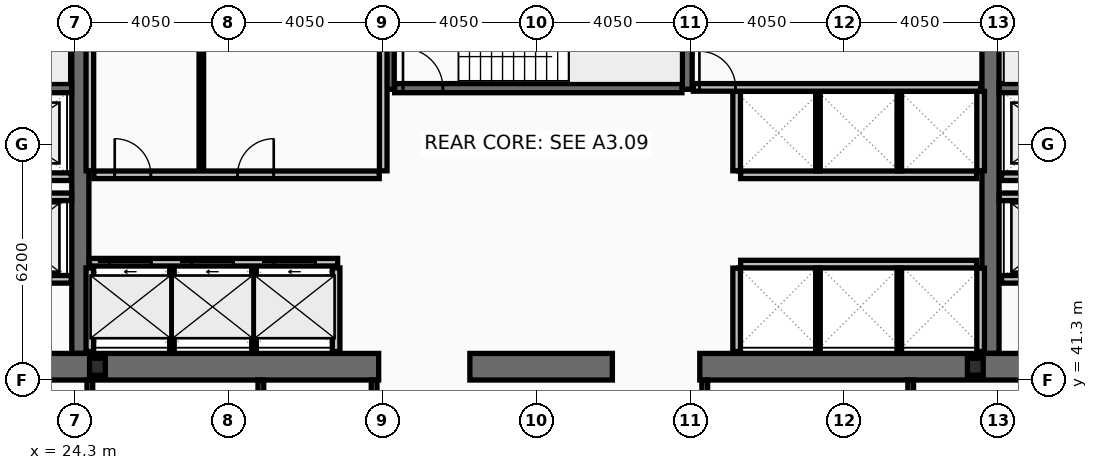
"""IFC4 building model, lengths in metres.
Left out: names, types, materials, properties, quantities, classifications, styles, units other than length and angle.
Written with IfcOpenShell. Run it as: python <this file> out.ifc"""

import sys

from ifc_helpers import new_model, si_unit, direction, frame, frame_2d, origin, origin_2d, place, context, subcontext, project, spatial, rectangle, i_section, extrude, element, fill, save


model = new_model("IFC4")
c1 = context("Model", 3, precision=1e-05, world=origin(), true_north=direction((0.0, 1.0)))
c2 = subcontext(c1, "Body", "Model", "MODEL_VIEW")
j1 = project(units=[si_unit("LENGTHUNIT", "METRE"), si_unit("PLANEANGLEUNIT", "RADIAN")], contexts=[c1])
p1 = place(None, origin())
s1 = spatial("IfcSite", under=j1, at=p1, CompositionType="ELEMENT")
p2 = place(p1, origin())
s2 = spatial("IfcBuilding", under=s1, at=p2, CompositionType="ELEMENT")
p3 = place(p2, frame((0.0, 0.0, 161.4)))
s3 = spatial("IfcBuildingStorey", under=s2, at=p3, CompositionType="ELEMENT", Elevation=161.4)
for number, where, z_axis, x_axis in (
    (1, (24.45, 42.0, 0.0), (0.0, 0.0, 1.0), (0.0, 1.0, 0.0)),
    (2, (48.4, 42.0, 0.0), (0.0, 0.0, 1.0), (0.0, 1.0, 0.0)),
):
    element("IfcWall", number, at=place(p3, frame(where, z_axis=z_axis, x_axis=x_axis)), inside=s3, PredefinedType="SHEAR", context=c2, shape_type="SweptSolid", body=[
        extrude(rectangle(XDim=11.0, YDim=0.45, at=frame_2d((5.5, 0.0))), origin(), (0.0, 0.0, 1.0), 3.44),
    ])
p4 = place(p3, frame((32.3, 41.65, 0.0), z_axis=(0.0, 0.0, 1.0), x_axis=(-1.0, 0.0, 0.0)))
e3 = element("IfcWall", 3, at=p4, inside=s3, PredefinedType="SHEAR", context=c2, shape_type="SweptSolid", body=[
    extrude(rectangle(XDim=11.45, YDim=0.7, at=frame_2d((5.725, 0.0))), origin(), (0.0, 0.0, 1.0), 3.44),
])
p5 = place(p3, frame((38.45, 41.65, 0.0), z_axis=(0.0, 0.0, 1.0), x_axis=(-1.0, 0.0, 0.0)))
e4 = element("IfcWall", 4, at=p5, inside=s3, PredefinedType="SHEAR", context=c2, shape_type="SweptSolid", body=[
    extrude(rectangle(XDim=3.75, YDim=0.7, at=frame_2d((1.875, 0.0))), origin(), (0.0, 0.0, 1.0), 3.44),
])
p6 = place(p3, frame((52.05, 41.65, 0.0), z_axis=(0.0, 0.0, 1.0), x_axis=(-1.0, 0.0, 0.0)))
e5 = element("IfcWall", 5, at=p6, inside=s3, PredefinedType="SHEAR", context=c2, shape_type="SweptSolid", body=[
    extrude(rectangle(XDim=11.3, YDim=0.7, at=frame_2d((5.65, 0.0))), origin(), (0.0, 0.0, 1.0), 3.44),
])
for number, where, z_axis, x_axis in (
    (6, (32.58, 48.95, 0.0), (0.0, 0.0, 1.0), (0.0, 1.0, 0.0)),
    (7, (40.42, 48.95, 0.0), (0.0, 0.0, 1.0), (0.0, 1.0, 0.0)),
):
    element("IfcWall", number, at=place(p3, frame(where, z_axis=z_axis, x_axis=x_axis)), inside=s3, PredefinedType="SHEAR", context=c2, shape_type="SweptSolid", body=[
        extrude(rectangle(XDim=4.05, YDim=0.26, at=frame_2d((2.025, 0.0))), origin(), (0.0, 0.0, 1.0), 3.44),
    ])
p7 = place(p3, frame((16.9, 48.98, 0.0), z_axis=(0.0, 0.0, 1.0), x_axis=(1.0, 0.0, 0.0)))
e8 = element("IfcWall", 8, at=p7, inside=s3, PredefinedType="SHEAR", context=c2, shape_type="SweptSolid", body=[
    extrude(rectangle(XDim=7.32, YDim=0.24, at=frame_2d((3.66, 0.0))), origin(), (0.0, 0.0, 1.0), 3.44),
])
p8 = place(p7, frame((0.22, 0.0, 0.0)))
e9 = element("IfcOpeningElement", 9, at=p8, cuts=e8, PredefinedType="OPENING", context=c2, shape_type="SweptSolid", body=[
    extrude(rectangle(XDim=1.05, YDim=2.15, at=frame_2d((0.525, 1.075))), frame((0.0, 0.13, 0.0), z_axis=(0.0, -1.0, 0.0), x_axis=(1.0, 0.0, 0.0)), (0.0, 0.0, 1.0), 0.26),
])
p9 = place(p3, frame((48.63, 48.98, 0.0), z_axis=(0.0, 0.0, 1.0), x_axis=(1.0, 0.0, 0.0)))
e10 = element("IfcWall", 10, at=p9, inside=s3, PredefinedType="SHEAR", context=c2, shape_type="SweptSolid", body=[
    extrude(rectangle(XDim=7.37, YDim=0.24, at=frame_2d((3.685, 0.0))), origin(), (0.0, 0.0, 1.0), 3.44),
])
p10 = place(p9, frame((6.1, 0.0, 0.0)))
e11 = element("IfcOpeningElement", 11, at=p10, cuts=e10, PredefinedType="OPENING", context=c2, shape_type="SweptSolid", body=[
    extrude(rectangle(XDim=1.05, YDim=2.15, at=frame_2d((0.525, 1.075))), frame((0.0, 0.13, 0.0), z_axis=(0.0, -1.0, 0.0), x_axis=(1.0, 0.0, 0.0)), (0.0, 0.0, 1.0), 0.26),
])
p11 = place(p3, frame((32.72, 48.98, 0.0), z_axis=(0.0, 0.0, 1.0), x_axis=(1.0, 0.0, 0.0)))
e12 = element("IfcWall", 12, at=p11, inside=s3, PredefinedType="SHEAR", context=c2, shape_type="SweptSolid", body=[
    extrude(rectangle(XDim=7.56, YDim=0.24, at=frame_2d((3.78, 0.0))), origin(), (0.0, 0.0, 1.0), 3.44),
])
p12 = place(p11, frame((0.22, 0.0, 0.0)))
e13 = element("IfcOpeningElement", 13, at=p12, cuts=e12, PredefinedType="OPENING", context=c2, shape_type="SweptSolid", body=[
    extrude(rectangle(XDim=1.05, YDim=2.15, at=frame_2d((0.525, 1.075))), frame((0.0, 0.13, 0.0), z_axis=(0.0, -1.0, 0.0), x_axis=(1.0, 0.0, 0.0)), (0.0, 0.0, 1.0), 0.26),
])
for number, where, z_axis, x_axis in (
    (14, (24.9, 41.65, 0.0), (0.0, 0.0, 1.0), (1.0, 0.0, 0.0)),
    (15, (48.0, 41.65, 0.0), (0.0, 0.0, 1.0), (1.0, 0.0, 0.0)),
):
    element("IfcColumn", number, at=place(p3, frame(where, z_axis=z_axis, x_axis=x_axis)), inside=s3, PredefinedType="COLUMN", context=c2, shape_type="SweptSolid", body=[
        extrude(i_section(OverallWidth=0.416, OverallDepth=0.446, WebThickness=0.039, FlangeThickness=0.063, at=origin_2d()), origin(), (0.0, 0.0, 1.0), 3.6),
    ])
p13 = place(p3, frame((24.69, 44.4, 0.0), z_axis=(0.0, 0.0, 1.0), x_axis=(1.0, 0.0, 0.0)))
e16 = element("IfcWall", 16, at=p13, inside=s3, PredefinedType="PARTITIONING", context=c2, shape_type="SweptSolid", body=[
    extrude(rectangle(XDim=6.53, YDim=0.2, at=frame_2d((3.265, 0.0))), origin(), (0.0, 0.0, 1.0), 3.44),
])
p14 = place(p13, frame((0.53, 0.0, 0.0)))
e17 = element("IfcOpeningElement", 17, at=p14, cuts=e16, PredefinedType="OPENING", context=c2, shape_type="SweptSolid", body=[
    extrude(rectangle(XDim=1.1, YDim=2.18, at=frame_2d((0.55, 1.09))), frame((0.0, 0.11, 0.0), z_axis=(0.0, -1.0, 0.0), x_axis=(1.0, 0.0, 0.0)), (0.0, 0.0, 1.0), 0.22),
])
p15 = place(p13, frame((2.69, 0.0, 0.0)))
e18 = element("IfcOpeningElement", 18, at=p15, cuts=e16, PredefinedType="OPENING", context=c2, shape_type="SweptSolid", body=[
    extrude(rectangle(XDim=1.1, YDim=2.18, at=frame_2d((0.55, 1.09))), frame((0.0, 0.11, 0.0), z_axis=(0.0, -1.0, 0.0), x_axis=(1.0, 0.0, 0.0)), (0.0, 0.0, 1.0), 0.22),
])
p16 = place(p13, frame((4.85, 0.0, 0.0)))
e19 = element("IfcOpeningElement", 19, at=p16, cuts=e16, PredefinedType="OPENING", context=c2, shape_type="SweptSolid", body=[
    extrude(rectangle(XDim=1.1, YDim=2.18, at=frame_2d((0.55, 1.09))), frame((0.0, 0.11, 0.0), z_axis=(0.0, -1.0, 0.0), x_axis=(1.0, 0.0, 0.0)), (0.0, 0.0, 1.0), 0.22),
])
p17 = place(p3, frame((51.61, 43.95, 0.0), z_axis=(0.0, 0.0, 1.0), x_axis=(-1.0, 0.0, 0.0)))
e20 = element("IfcWall", 20, at=p17, inside=s3, PredefinedType="PARTITIONING", context=c2, shape_type="SweptSolid", body=[
    extrude(rectangle(XDim=2.92, YDim=0.2, at=frame_2d((1.46, 0.0))), origin(), (0.0, 0.0, 1.0), 3.44),
])
p18 = place(p17, frame((0.81, 0.0, 0.0)))
e21 = element("IfcOpeningElement", 21, at=p18, cuts=e20, PredefinedType="OPENING", context=c2, shape_type="SweptSolid", body=[
    extrude(rectangle(XDim=1.3, YDim=2.18, at=frame_2d((0.65, 1.09))), frame((0.0, 0.11, 0.0), z_axis=(0.0, -1.0, 0.0), x_axis=(1.0, 0.0, 0.0)), (0.0, 0.0, 1.0), 0.22),
])
p19 = place(p3, frame((24.21, 43.95, 0.0), z_axis=(0.0, 0.0, 1.0), x_axis=(-1.0, 0.0, 0.0)))
e22 = element("IfcWall", 22, at=p19, inside=s3, PredefinedType="PARTITIONING", context=c2, shape_type="SweptSolid", body=[
    extrude(rectangle(XDim=2.97, YDim=0.2, at=frame_2d((1.485, 0.0))), origin(), (0.0, 0.0, 1.0), 3.44),
])
p20 = place(p19, frame((0.86, 0.0, 0.0)))
e23 = element("IfcOpeningElement", 23, at=p20, cuts=e22, PredefinedType="OPENING", context=c2, shape_type="SweptSolid", body=[
    extrude(rectangle(XDim=1.3, YDim=2.18, at=frame_2d((0.65, 1.09))), frame((0.0, 0.11, 0.0), z_axis=(0.0, -1.0, 0.0), x_axis=(1.0, 0.0, 0.0)), (0.0, 0.0, 1.0), 0.22),
])
p21 = place(p3, frame((51.61, 46.65, 0.0), z_axis=(0.0, 0.0, 1.0), x_axis=(-1.0, 0.0, 0.0)))
e24 = element("IfcWall", 24, at=p21, inside=s3, PredefinedType="PARTITIONING", context=c2, shape_type="SweptSolid", body=[
    extrude(rectangle(XDim=2.92, YDim=0.2, at=frame_2d((1.46, 0.0))), origin(), (0.0, 0.0, 1.0), 3.44),
])
p22 = place(p21, frame((0.86, 0.0, 0.0)))
e25 = element("IfcOpeningElement", 25, at=p22, cuts=e24, PredefinedType="OPENING", context=c2, shape_type="SweptSolid", body=[
    extrude(rectangle(XDim=1.2, YDim=2.18, at=frame_2d((0.6, 1.09))), frame((0.0, 0.11, 0.0), z_axis=(0.0, -1.0, 0.0), x_axis=(1.0, 0.0, 0.0)), (0.0, 0.0, 1.0), 0.22),
])
p23 = place(p3, frame((24.21, 46.65, 0.0), z_axis=(0.0, 0.0, 1.0), x_axis=(-1.0, 0.0, 0.0)))
e26 = element("IfcWall", 26, at=p23, inside=s3, PredefinedType="PARTITIONING", context=c2, shape_type="SweptSolid", body=[
    extrude(rectangle(XDim=2.97, YDim=0.2, at=frame_2d((1.485, 0.0))), origin(), (0.0, 0.0, 1.0), 3.44),
])
p24 = place(p23, frame((0.91, 0.0, 0.0)))
e27 = element("IfcOpeningElement", 27, at=p24, cuts=e26, PredefinedType="OPENING", context=c2, shape_type="SweptSolid", body=[
    extrude(rectangle(XDim=1.2, YDim=2.18, at=frame_2d((0.6, 1.09))), frame((0.0, 0.11, 0.0), z_axis=(0.0, -1.0, 0.0), x_axis=(1.0, 0.0, 0.0)), (0.0, 0.0, 1.0), 0.22),
])
p25 = place(p3, frame((21.2, 46.12, 0.0), z_axis=(0.0, 0.0, 1.0), x_axis=(1.0, 0.0, 0.0)))
e28 = element("IfcWall", 28, at=p25, inside=s3, PredefinedType="PARTITIONING", context=c2, shape_type="SweptSolid", body=[
    extrude(rectangle(XDim=3.02, YDim=0.2, at=frame_2d((1.51, 0.0))), origin(), (0.0, 0.0, 1.0), 3.44),
])
p26 = place(p3, frame((48.63, 46.12, 0.0), z_axis=(0.0, 0.0, 1.0), x_axis=(1.0, 0.0, 0.0)))
e29 = element("IfcWall", 29, at=p26, inside=s3, PredefinedType="PARTITIONING", context=c2, shape_type="SweptSolid", body=[
    extrude(rectangle(XDim=3.07, YDim=0.2, at=frame_2d((1.535, 0.0))), origin(), (0.0, 0.0, 1.0), 3.44),
])
for number, where, z_axis, x_axis in (
    (30, (24.7, 46.805, 0.0), (0.0, 0.0, 1.0), (0.0, 1.0, 0.0)),
    (31, (32.42, 46.805, 0.0), (0.0, 0.0, 1.0), (0.0, 1.0, 0.0)),
):
    element("IfcWall", number, at=place(p3, frame(where, z_axis=z_axis, x_axis=x_axis)), inside=s3, PredefinedType="PARTITIONING", context=c2, shape_type="SweptSolid", body=[
        extrude(rectangle(XDim=5.99, YDim=0.2, at=frame_2d((2.995, 0.0))), origin(), (0.0, 0.0, 1.0), 3.44),
    ])
p27 = place(p3, frame((27.634, 46.805, 0.0), z_axis=(0.0, 0.0, 1.0), x_axis=(0.0, 1.0, 0.0)))
e32 = element("IfcWall", 32, at=p27, inside=s3, PredefinedType="PARTITIONING", context=c2, shape_type="SweptSolid", body=[
    extrude(rectangle(XDim=5.99, YDim=0.12, at=frame_2d((2.995, 0.0))), origin(), (0.0, 0.0, 1.0), 3.44),
])
p28 = place(p3, frame((24.805, 46.7, 0.0), z_axis=(0.0, 0.0, 1.0), x_axis=(1.0, 0.0, 0.0)))
e33 = element("IfcWall", 33, at=p28, inside=s3, PredefinedType="PARTITIONING", context=c2, shape_type="SweptSolid", body=[
    extrude(rectangle(XDim=7.51, YDim=0.2, at=frame_2d((3.755, 0.0))), origin(), (0.0, 0.0, 1.0), 3.44),
])
p29 = place(p28, frame((0.55, 0.0, 0.0)))
e34 = element("IfcOpeningElement", 34, at=p29, cuts=e33, PredefinedType="OPENING", context=c2, shape_type="SweptSolid", body=[
    extrude(rectangle(XDim=0.95, YDim=2.1, at=frame_2d((0.475, 1.05))), frame((0.0, 0.11, 0.0), z_axis=(0.0, -1.0, 0.0), x_axis=(1.0, 0.0, 0.0)), (0.0, 0.0, 1.0), 0.22),
])
p30 = place(p28, frame((3.784, 0.0, 0.0)))
e35 = element("IfcOpeningElement", 35, at=p30, cuts=e33, PredefinedType="OPENING", context=c2, shape_type="SweptSolid", body=[
    extrude(rectangle(XDim=0.95, YDim=2.1, at=frame_2d((0.475, 1.05))), frame((0.0, 0.11, 0.0), z_axis=(0.0, -1.0, 0.0), x_axis=(1.0, 0.0, 0.0)), (0.0, 0.0, 1.0), 0.22),
])
for number, where, z_axis, x_axis in (
    (36, (24.7, 42.05, 0.0), (0.0, 0.0, 1.0), (0.0, 1.0, 0.0)),
    (37, (31.18, 42.05, 0.0), (0.0, 0.0, 1.0), (0.0, 1.0, 0.0)),
):
    element("IfcWall", number, at=place(p3, frame(where, z_axis=z_axis, x_axis=x_axis)), inside=s3, PredefinedType="PARTITIONING", context=c2, shape_type="SweptSolid", body=[
        extrude(rectangle(XDim=2.2, YDim=0.2, at=frame_2d((1.1, 0.0))), origin(), (0.0, 0.0, 1.0), 3.44),
    ])
for number, where, z_axis, x_axis in (
    (38, (26.86, 42.05, 0.0), (0.0, 0.0, 1.0), (0.0, 1.0, 0.0)),
    (39, (29.02, 42.05, 0.0), (0.0, 0.0, 1.0), (0.0, 1.0, 0.0)),
):
    element("IfcWall", number, at=place(p3, frame(where, z_axis=z_axis, x_axis=x_axis)), inside=s3, PredefinedType="PARTITIONING", context=c2, shape_type="SweptSolid", body=[
        extrude(rectangle(XDim=2.2, YDim=0.12, at=frame_2d((1.1, 0.0))), origin(), (0.0, 0.0, 1.0), 3.44),
    ])
p31 = place(p3, frame((41.825, 46.7, 0.0), z_axis=(0.0, 0.0, 1.0), x_axis=(1.0, 0.0, 0.0)))
e40 = element("IfcWall", 40, at=p31, inside=s3, PredefinedType="PARTITIONING", context=c2, shape_type="SweptSolid", body=[
    extrude(rectangle(XDim=6.21, YDim=0.2, at=frame_2d((3.105, 0.0))), origin(), (0.0, 0.0, 1.0), 3.44),
])
for number, where, z_axis, x_axis in (
    (41, (41.72, 46.805, 0.0), (0.0, 0.0, 1.0), (0.0, 1.0, 0.0)),
    (42, (48.14, 46.805, 0.0), (0.0, 0.0, 1.0), (0.0, 1.0, 0.0)),
):
    element("IfcWall", number, at=place(p3, frame(where, z_axis=z_axis, x_axis=x_axis)), inside=s3, PredefinedType="PARTITIONING", context=c2, shape_type="SweptSolid", body=[
        extrude(rectangle(XDim=2.09, YDim=0.2, at=frame_2d((1.045, 0.0))), origin(), (0.0, 0.0, 1.0), 3.44),
    ])
for number, where, z_axis, x_axis in (
    (43, (43.86, 46.805, 0.0), (0.0, 0.0, 1.0), (0.0, 1.0, 0.0)),
    (44, (46.0, 46.805, 0.0), (0.0, 0.0, 1.0), (0.0, 1.0, 0.0)),
):
    element("IfcWall", number, at=place(p3, frame(where, z_axis=z_axis, x_axis=x_axis)), inside=s3, PredefinedType="PARTITIONING", context=c2, shape_type="SweptSolid", body=[
        extrude(rectangle(XDim=2.09, YDim=0.12, at=frame_2d((1.045, 0.0))), origin(), (0.0, 0.0, 1.0), 3.44),
    ])
p32 = place(p3, frame((41.825, 44.35, 0.0), z_axis=(0.0, 0.0, 1.0), x_axis=(1.0, 0.0, 0.0)))
e45 = element("IfcWall", 45, at=p32, inside=s3, PredefinedType="PARTITIONING", context=c2, shape_type="SweptSolid", body=[
    extrude(rectangle(XDim=6.21, YDim=0.2, at=frame_2d((3.105, 0.0))), origin(), (0.0, 0.0, 1.0), 3.44),
])
for number, where, z_axis, x_axis in (
    (46, (41.72, 42.05, 0.0), (0.0, 0.0, 1.0), (0.0, 1.0, 0.0)),
    (47, (48.14, 42.05, 0.0), (0.0, 0.0, 1.0), (0.0, 1.0, 0.0)),
):
    element("IfcWall", number, at=place(p3, frame(where, z_axis=z_axis, x_axis=x_axis)), inside=s3, PredefinedType="PARTITIONING", context=c2, shape_type="SweptSolid", body=[
        extrude(rectangle(XDim=2.195, YDim=0.2, at=frame_2d((1.098, 0.0))), origin(), (0.0, 0.0, 1.0), 3.44),
    ])
for number, where, z_axis, x_axis in (
    (48, (43.86, 42.05, 0.0), (0.0, 0.0, 1.0), (0.0, 1.0, 0.0)),
    (49, (46.0, 42.05, 0.0), (0.0, 0.0, 1.0), (0.0, 1.0, 0.0)),
):
    element("IfcWall", number, at=place(p3, frame(where, z_axis=z_axis, x_axis=x_axis)), inside=s3, PredefinedType="PARTITIONING", context=c2, shape_type="SweptSolid", body=[
        extrude(rectangle(XDim=2.195, YDim=0.12, at=frame_2d((1.098, 0.0))), origin(), (0.0, 0.0, 1.0), 3.44),
    ])
p33 = place(p3, frame((40.58, 49.0, 0.0), z_axis=(0.0, 0.0, 1.0), x_axis=(1.0, 0.0, 0.0)))
e50 = element("IfcWall", 50, at=p33, inside=s3, PredefinedType="PARTITIONING", context=c2, shape_type="SweptSolid", body=[
    extrude(rectangle(XDim=7.56, YDim=0.2, at=frame_2d((3.78, 0.0))), origin(), (0.0, 0.0, 1.0), 3.44),
])
p34 = place(p33, frame((0.16, 0.0, 0.0)))
e51 = element("IfcOpeningElement", 51, at=p34, cuts=e50, PredefinedType="OPENING", context=c2, shape_type="SweptSolid", body=[
    extrude(rectangle(XDim=0.95, YDim=2.1, at=frame_2d((0.475, 1.05))), frame((0.0, 0.11, 0.0), z_axis=(0.0, -1.0, 0.0), x_axis=(1.0, 0.0, 0.0)), (0.0, 0.0, 1.0), 0.22),
])
p35 = place(p3, frame((24.7, 38.28, 0.0), z_axis=(0.0, 0.0, 1.0), x_axis=(0.0, 1.0, 0.0)))
e52 = element("IfcWall", 52, at=p35, inside=s3, PredefinedType="PARTITIONING", context=c2, shape_type="SweptSolid", body=[
    extrude(rectangle(XDim=3.02, YDim=0.15, at=frame_2d((1.51, 0.0))), origin(), (0.0, 0.0, 1.0), 2.73),
])
for number, where, z_axis, x_axis in (
    (53, (29.2, 38.28, 0.0), (0.0, 0.0, 1.0), (0.0, 1.0, 0.0)),
    (54, (32.18, 38.28, 0.0), (0.0, 0.0, 1.0), (0.0, 1.0, 0.0)),
    (55, (40.88, 38.28, 0.0), (0.0, 0.0, 1.0), (0.0, 1.0, 0.0)),
    (56, (46.3, 38.28, 0.0), (0.0, 0.0, 1.0), (0.0, 1.0, 0.0)),
):
    element("IfcWall", number, at=place(p3, frame(where, z_axis=z_axis, x_axis=x_axis)), inside=s3, PredefinedType="PARTITIONING", context=c2, shape_type="SweptSolid", body=[
        extrude(rectangle(XDim=3.02, YDim=0.15, at=frame_2d((1.51, 0.0))), origin(), (0.0, 0.0, 1.0), 3.44),
    ])
p36 = place(p12, origin())
e57 = element("IfcDoor", 57, at=p36, inside=s3, OperationType="SINGLE_SWING_LEFT", PredefinedType="DOOR", context=c2, shape_type="SweptSolid", body=[
    extrude(rectangle(XDim=1.05, YDim=2.15, at=frame_2d((0.525, 1.075))), frame((0.0, 0.025, 0.0), z_axis=(0.0, -1.0, 0.0), x_axis=(1.0, 0.0, 0.0)), (0.0, 0.0, 1.0), 0.05),
])
fill(e13, e57)
p37 = place(p14, origin())
e58 = element("IfcDoor", 58, at=p37, inside=s3, OperationType="SLIDING_TO_LEFT", PredefinedType="DOOR", context=c2, shape_type="SweptSolid", body=[
    extrude(rectangle(XDim=1.1, YDim=2.18, at=frame_2d((0.55, 1.09))), frame((0.0, 0.025, 0.0), z_axis=(0.0, -1.0, 0.0), x_axis=(1.0, 0.0, 0.0)), (0.0, 0.0, 1.0), 0.05),
])
fill(e17, e58)
p38 = place(p15, origin())
e59 = element("IfcDoor", 59, at=p38, inside=s3, OperationType="SLIDING_TO_LEFT", PredefinedType="DOOR", context=c2, shape_type="SweptSolid", body=[
    extrude(rectangle(XDim=1.1, YDim=2.18, at=frame_2d((0.55, 1.09))), frame((0.0, 0.025, 0.0), z_axis=(0.0, -1.0, 0.0), x_axis=(1.0, 0.0, 0.0)), (0.0, 0.0, 1.0), 0.05),
])
fill(e18, e59)
p39 = place(p16, origin())
e60 = element("IfcDoor", 60, at=p39, inside=s3, OperationType="SLIDING_TO_LEFT", PredefinedType="DOOR", context=c2, shape_type="SweptSolid", body=[
    extrude(rectangle(XDim=1.1, YDim=2.18, at=frame_2d((0.55, 1.09))), frame((0.0, 0.025, 0.0), z_axis=(0.0, -1.0, 0.0), x_axis=(1.0, 0.0, 0.0)), (0.0, 0.0, 1.0), 0.05),
])
fill(e19, e60)
p40 = place(p29, origin())
e61 = element("IfcDoor", 61, at=p40, inside=s3, OperationType="SINGLE_SWING_LEFT", PredefinedType="DOOR", context=c2, shape_type="SweptSolid", body=[
    extrude(rectangle(XDim=0.95, YDim=2.1, at=frame_2d((0.475, 1.05))), frame((0.0, 0.025, 0.0), z_axis=(0.0, -1.0, 0.0), x_axis=(1.0, 0.0, 0.0)), (0.0, 0.0, 1.0), 0.05),
])
fill(e34, e61)
p41 = place(p30, origin())
e62 = element("IfcDoor", 62, at=p41, inside=s3, OperationType="SINGLE_SWING_RIGHT", PredefinedType="DOOR", context=c2, shape_type="SweptSolid", body=[
    extrude(rectangle(XDim=0.95, YDim=2.1, at=frame_2d((0.475, 1.05))), frame((0.0, 0.025, 0.0), z_axis=(0.0, -1.0, 0.0), x_axis=(1.0, 0.0, 0.0)), (0.0, 0.0, 1.0), 0.05),
])
fill(e35, e62)
p42 = place(p34, origin())
e63 = element("IfcDoor", 63, at=p42, inside=s3, OperationType="SINGLE_SWING_LEFT", PredefinedType="DOOR", context=c2, shape_type="SweptSolid", body=[
    extrude(rectangle(XDim=0.95, YDim=2.1, at=frame_2d((0.475, 1.05))), frame((0.0, 0.025, 0.0), z_axis=(0.0, -1.0, 0.0), x_axis=(1.0, 0.0, 0.0)), (0.0, 0.0, 1.0), 0.05),
])
fill(e51, e63)
save(model, sys.argv[1])
